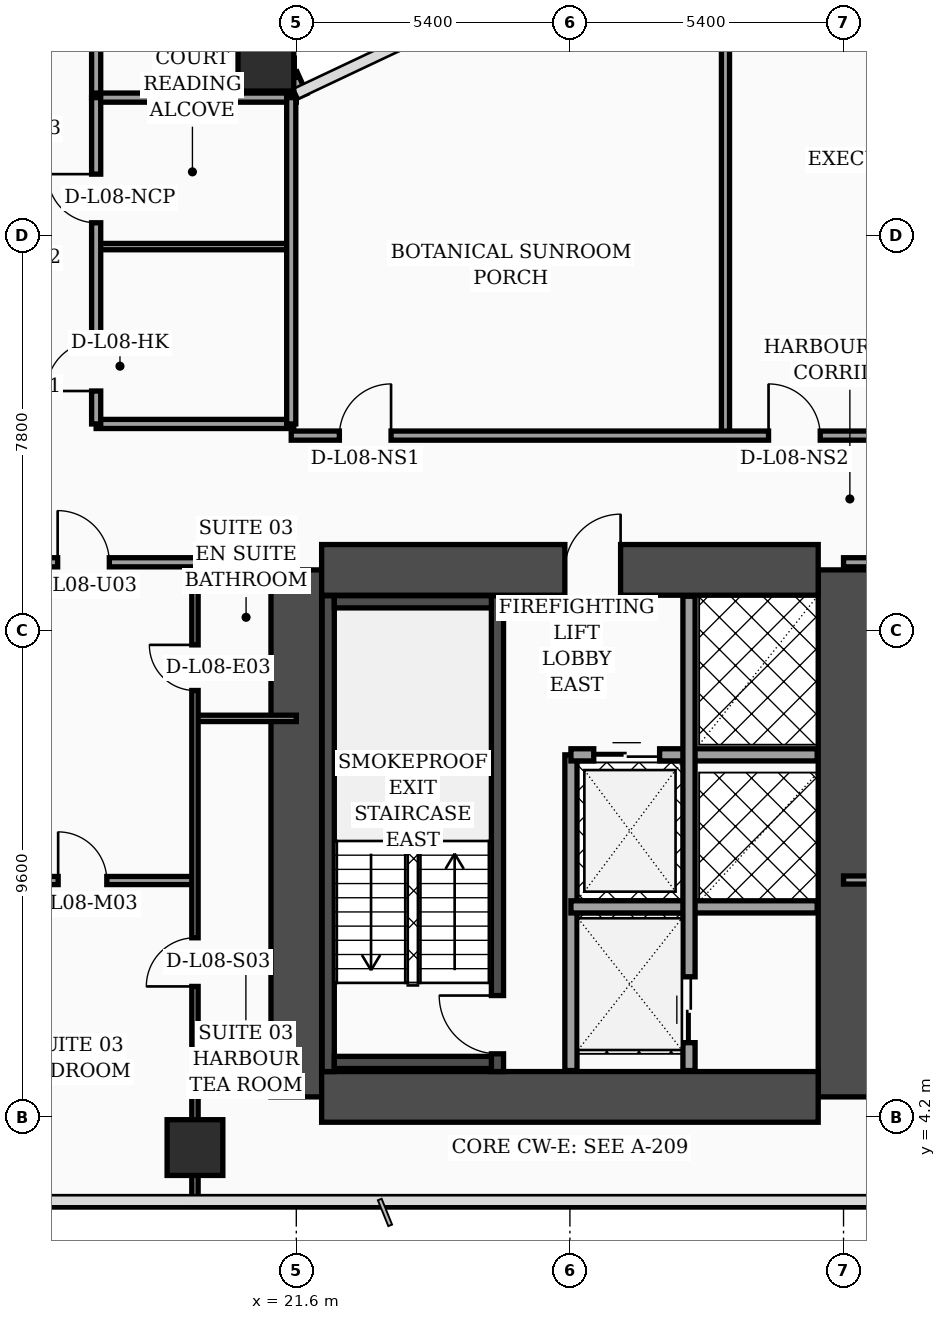
"""IFC4 building model, lengths in metres.
Left out: names, types, materials, properties, quantities, classifications, styles, units other than length and angle.
Written with IfcOpenShell. Run it as: python <this file> out.ifc"""

import sys

from ifc_helpers import new_model, si_unit, direction, frame, frame_2d, origin, origin_2d, place, context, subcontext, project, spatial, rectangle, hollow_rectangle, extrude, element, fill, save


model = new_model("IFC4")
c1 = context("Model", 3, precision=1e-05, world=origin(), true_north=direction((0.0, 1.0)))
c2 = subcontext(c1, "Body", "Model", "MODEL_VIEW")
j1 = project(units=[si_unit("LENGTHUNIT", "METRE"), si_unit("PLANEANGLEUNIT", "RADIAN")], contexts=[c1])
p1 = place(None, origin())
s1 = spatial("IfcSite", under=j1, at=p1, CompositionType="ELEMENT")
p2 = place(p1, origin())
s2 = spatial("IfcBuilding", under=s1, at=p2, CompositionType="ELEMENT")
p3 = place(p2, frame((0.0, 0.0, 38.4)))
s3 = spatial("IfcBuildingStorey", under=s2, at=p3, CompositionType="ELEMENT", Elevation=38.4)
for number, where, z_axis, x_axis in (
    (1, (21.6, 4.6, 0.0), (0.0, 0.0, 1.0), (0.0, 1.0, 0.0)),
    (2, (32.4, 4.6, 0.0), (0.0, 0.0, 1.0), (0.0, 1.0, 0.0)),
):
    element("IfcWall", number, at=place(p3, frame(where, z_axis=z_axis, x_axis=x_axis)), inside=s3, PredefinedType="SHEAR", context=c2, shape_type="SweptSolid", body=[
        extrude(rectangle(XDim=10.4, YDim=1.0, at=frame_2d((5.2, 0.0))), origin(), (0.0, 0.0, 1.0), 3.56),
    ])
p4 = place(p3, frame((22.1, 15.0, 0.0), z_axis=(0.0, 0.0, 1.0), x_axis=(1.0, 0.0, 0.0)))
e3 = element("IfcWall", 3, at=p4, inside=s3, PredefinedType="SHEAR", context=c2, shape_type="SweptSolid", body=[
    extrude(rectangle(XDim=9.8, YDim=1.0, at=frame_2d((4.9, 0.0))), origin(), (0.0, 0.0, 1.0), 3.56),
])
p5 = place(p4, frame((4.8, 0.0, 0.0)))
e4 = element("IfcOpeningElement", 4, at=p5, cuts=e3, PredefinedType="OPENING", context=c2, shape_type="SweptSolid", body=[
    extrude(rectangle(XDim=1.1, YDim=2.2, at=frame_2d((0.55, 1.1))), frame((0.0, 0.51, 0.0), z_axis=(0.0, -1.0, 0.0), x_axis=(1.0, 0.0, 0.0)), (0.0, 0.0, 1.0), 1.02),
])
p6 = place(p3, frame((22.1, 4.6, 0.0), z_axis=(0.0, 0.0, 1.0), x_axis=(1.0, 0.0, 0.0)))
e5 = element("IfcWall", 5, at=p6, inside=s3, PredefinedType="SHEAR", context=c2, shape_type="SweptSolid", body=[
    extrude(rectangle(XDim=9.8, YDim=1.0, at=frame_2d((4.9, 0.0))), origin(), (0.0, 0.0, 1.0), 3.56),
])
p7 = place(p3, frame((22.23, 5.1, 0.0), z_axis=(0.0, 0.0, 1.0), x_axis=(0.0, 1.0, 0.0)))
e6 = element("IfcWall", 6, at=p7, inside=s3, PredefinedType="SOLIDWALL", context=c2, shape_type="SweptSolid", body=[
    extrude(rectangle(XDim=9.39, YDim=0.24, at=frame_2d((4.695, 0.0))), origin(), (0.0, 0.0, 1.0), 3.56),
])
p8 = place(p3, frame((25.57, 5.1, 0.0), z_axis=(0.0, 0.0, 1.0), x_axis=(0.0, 1.0, 0.0)))
e7 = element("IfcWall", 7, at=p8, inside=s3, PredefinedType="SOLIDWALL", context=c2, shape_type="SweptSolid", body=[
    extrude(rectangle(XDim=9.39, YDim=0.24, at=frame_2d((4.695, 0.0))), origin(), (0.0, 0.0, 1.0), 3.56),
])
p9 = place(p8, frame((0.35, 0.0, 0.0)))
e8 = element("IfcOpeningElement", 8, at=p9, cuts=e7, PredefinedType="OPENING", context=c2, shape_type="SweptSolid", body=[
    extrude(rectangle(XDim=1.15, YDim=2.2, at=frame_2d((0.575, 1.1))), frame((0.0, 0.13, 0.0), z_axis=(0.0, -1.0, 0.0), x_axis=(1.0, 0.0, 0.0)), (0.0, 0.0, 1.0), 0.26),
])
for number, where, z_axis, x_axis in (
    (9, (22.35, 5.28, 0.0), (0.0, 0.0, 1.0), (1.0, 0.0, 0.0)),
    (10, (22.35, 14.37, 0.0), (0.0, 0.0, 1.0), (1.0, 0.0, 0.0)),
):
    element("IfcWall", number, at=place(p3, frame(where, z_axis=z_axis, x_axis=x_axis)), inside=s3, PredefinedType="SOLIDWALL", context=c2, shape_type="SweptSolid", body=[
        extrude(rectangle(XDim=3.1, YDim=0.24, at=frame_2d((1.55, 0.0))), origin(), (0.0, 0.0, 1.0), 3.56),
    ])
for number, where, z_axis, x_axis in (
    (11, (21.0, 25.0, 0.0), (0.0, 0.0, 1.0), (1.0, 0.0, 0.0)),
    (12, (19.6, 3.6, 0.0), (0.0, 0.0, 1.0), (1.0, 0.0, 0.0)),
):
    element("IfcColumn", number, at=place(p3, frame(where, z_axis=z_axis, x_axis=x_axis)), inside=s3, PredefinedType="COLUMN", context=c2, shape_type="SweptSolid", body=[
        extrude(hollow_rectangle(XDim=1.1, YDim=1.1, WallThickness=0.045, at=origin_2d()), origin(), (0.0, 0.0, 1.0), 3.56),
    ])
p10 = place(p3, frame((21.68, 24.34, 0.0), z_axis=(0.0, 0.0, 1.0), x_axis=(-0.40758134973, 0.913168901875, 0.0)))
e13 = element("IfcWall", 13, at=p10, inside=s3, PredefinedType="SOLIDWALL", context=c2, shape_type="SweptSolid", body=[
    extrude(rectangle(XDim=0.471, YDim=0.28, at=frame_2d((0.235, 0.0))), origin(), (0.0, 0.0, 1.0), 3.56),
])
p11 = place(p3, frame((27.02, 5.12, 0.0), z_axis=(0.0, 0.0, 1.0), x_axis=(0.0, 1.0, 0.0)))
e14 = element("IfcWall", 14, at=p11, inside=s3, PredefinedType="SOLIDWALL", context=c2, shape_type="SweptSolid", body=[
    extrude(rectangle(XDim=6.23, YDim=0.24, at=frame_2d((3.115, 0.0))), origin(), (0.0, 0.0, 1.0), 3.56),
])
p12 = place(p3, frame((27.02, 11.35, 0.0), z_axis=(0.0, 0.0, 1.0), x_axis=(1.0, 0.0, 0.0)))
e15 = element("IfcWall", 15, at=p12, inside=s3, PredefinedType="SOLIDWALL", context=c2, shape_type="SweptSolid", body=[
    extrude(rectangle(XDim=4.86, YDim=0.24, at=frame_2d((2.43, 0.0))), origin(), (0.0, 0.0, 1.0), 3.56),
])
p13 = place(p12, frame((0.45, 0.0, 0.0)))
e16 = element("IfcOpeningElement", 16, at=p13, cuts=e15, PredefinedType="OPENING", context=c2, shape_type="SweptSolid", body=[
    extrude(rectangle(XDim=1.3, YDim=2.35, at=frame_2d((0.65, 1.175))), frame((0.0, 0.13, 0.0), z_axis=(0.0, -1.0, 0.0), x_axis=(1.0, 0.0, 0.0)), (0.0, 0.0, 1.0), 0.26),
])
p14 = place(p3, frame((27.02, 8.35, 0.0), z_axis=(0.0, 0.0, 1.0), x_axis=(1.0, 0.0, 0.0)))
e17 = element("IfcWall", 17, at=p14, inside=s3, PredefinedType="SOLIDWALL", context=c2, shape_type="SweptSolid", body=[
    extrude(rectangle(XDim=4.86, YDim=0.24, at=frame_2d((2.43, 0.0))), origin(), (0.0, 0.0, 1.0), 3.56),
])
p15 = place(p3, frame((29.35, 5.12, 0.0), z_axis=(0.0, 0.0, 1.0), x_axis=(0.0, 1.0, 0.0)))
e18 = element("IfcWall", 18, at=p15, inside=s3, PredefinedType="SOLIDWALL", context=c2, shape_type="SweptSolid", body=[
    extrude(rectangle(XDim=9.36, YDim=0.24, at=frame_2d((4.68, 0.0))), origin(), (0.0, 0.0, 1.0), 3.56),
])
p16 = place(p15, frame((0.55, 0.0, 0.0)))
e19 = element("IfcOpeningElement", 19, at=p16, cuts=e18, PredefinedType="OPENING", context=c2, shape_type="SweptSolid", body=[
    extrude(rectangle(XDim=1.3, YDim=2.35, at=frame_2d((0.65, 1.175))), frame((0.0, 0.13, 0.0), z_axis=(0.0, -1.0, 0.0), x_axis=(1.0, 0.0, 0.0)), (0.0, 0.0, 1.0), 0.26),
])
p17 = place(p3, frame((19.6, 12.07, 0.0), z_axis=(0.0, 0.0, 1.0), x_axis=(1.0, 0.0, 0.0)))
e20 = element("IfcWall", 20, at=p17, inside=s3, PredefinedType="PARTITIONING", context=c2, shape_type="SweptSolid", body=[
    extrude(rectangle(XDim=2.0, YDim=0.125, at=frame_2d((1.0, 0.0))), origin(), (0.0, 0.0, 1.0), 3.56),
])
p18 = place(p3, frame((15.15, 8.87, 0.0), z_axis=(0.0, 0.0, 1.0), x_axis=(1.0, 0.0, 0.0)))
e21 = element("IfcWall", 21, at=p18, inside=s3, PredefinedType="PARTITIONING", context=c2, shape_type="SweptSolid", body=[
    extrude(rectangle(XDim=4.45, YDim=0.16, at=frame_2d((2.225, 0.0))), origin(), (0.0, 0.0, 1.0), 3.56),
])
p19 = place(p18, frame((1.75, 0.0, 0.0)))
e22 = element("IfcOpeningElement", 22, at=p19, cuts=e21, PredefinedType="OPENING", context=c2, shape_type="SweptSolid", body=[
    extrude(rectangle(XDim=0.96, YDim=2.2, at=frame_2d((0.48, 1.1))), frame((0.0, 0.09, 0.0), z_axis=(0.0, -1.0, 0.0), x_axis=(1.0, 0.0, 0.0)), (0.0, 0.0, 1.0), 0.18),
])
p20 = place(p3, frame((19.6, 2.44, 0.0), z_axis=(0.0, 0.0, 1.0), x_axis=(0.0, 1.0, 0.0)))
e23 = element("IfcWall", 23, at=p20, inside=s3, PredefinedType="PARTITIONING", context=c2, shape_type="SweptSolid", body=[
    extrude(rectangle(XDim=12.71, YDim=0.125, at=frame_2d((6.355, 0.0))), origin(), (0.0, 0.0, 1.0), 2.34),
])
p21 = place(p20, frame((4.34, 0.0, 0.0)))
e24 = element("IfcOpeningElement", 24, at=p21, cuts=e23, PredefinedType="OPENING", context=c2, shape_type="SweptSolid", body=[
    extrude(rectangle(XDim=0.96, YDim=2.2, at=frame_2d((0.48, 1.1))), frame((0.0, 0.073, 0.0), z_axis=(0.0, -1.0, 0.0), x_axis=(1.0, 0.0, 0.0)), (0.0, 0.0, 1.0), 0.145),
])
p22 = place(p20, frame((10.18, 0.0, 0.0)))
e25 = element("IfcOpeningElement", 25, at=p22, cuts=e23, PredefinedType="OPENING", context=c2, shape_type="SweptSolid", body=[
    extrude(rectangle(XDim=0.9, YDim=2.15, at=frame_2d((0.45, 1.075))), frame((0.0, 0.073, 0.0), z_axis=(0.0, -1.0, 0.0), x_axis=(1.0, 0.0, 0.0)), (0.0, 0.0, 1.0), 0.145),
])
p23 = place(p3, frame((15.15, 15.15, 0.0), z_axis=(0.0, 0.0, 1.0), x_axis=(1.0, 0.0, 0.0)))
e26 = element("IfcWall", 26, at=p23, inside=s3, PredefinedType="PARTITIONING", context=c2, shape_type="SweptSolid", body=[
    extrude(rectangle(XDim=6.45, YDim=0.18, at=frame_2d((3.225, 0.0))), origin(), (0.0, 0.0, 1.0), 2.34),
])
p24 = place(p23, frame((1.74, 0.0, 0.0)))
e27 = element("IfcOpeningElement", 27, at=p24, cuts=e26, PredefinedType="OPENING", context=c2, shape_type="SweptSolid", body=[
    extrude(rectangle(XDim=1.02, YDim=2.2, at=frame_2d((0.51, 1.1))), frame((0.0, 0.1, 0.0), z_axis=(0.0, -1.0, 0.0), x_axis=(1.0, 0.0, 0.0)), (0.0, 0.0, 1.0), 0.2),
])
p25 = place(p3, frame((17.65, 24.3, 0.0), z_axis=(0.0, 0.0, 1.0), x_axis=(0.0, 1.0, 0.0)))
e28 = element("IfcWall", 28, at=p25, inside=s3, PredefinedType="PARTITIONING", context=c2, shape_type="SweptSolid", body=[
    extrude(rectangle(XDim=16.4, YDim=0.18, at=frame_2d((8.2, 0.0))), origin(), (0.0, 0.0, 1.0), 2.84),
])
p26 = place(p3, frame((17.65, 17.88, 0.0), z_axis=(0.0, 0.0, 1.0), x_axis=(1.0, 0.0, 0.0)))
e29 = element("IfcWall", 29, at=p26, inside=s3, PredefinedType="PARTITIONING", context=c2, shape_type="SweptSolid", body=[
    extrude(rectangle(XDim=3.9, YDim=0.18, at=frame_2d((1.95, 0.0))), origin(), (0.0, 0.0, 1.0), 3.56),
])
p27 = place(p3, frame((17.65, 21.38, 0.0), z_axis=(0.0, 0.0, 1.0), x_axis=(1.0, 0.0, 0.0)))
e30 = element("IfcWall", 30, at=p27, inside=s3, PredefinedType="PARTITIONING", context=c2, shape_type="SweptSolid", body=[
    extrude(rectangle(XDim=3.9, YDim=0.125, at=frame_2d((1.95, 0.0))), origin(), (0.0, 0.0, 1.0), 3.09),
])
p28 = place(p3, frame((17.65, 24.32, 0.0), z_axis=(0.0, 0.0, 1.0), x_axis=(1.0, 0.0, 0.0)))
e31 = element("IfcWall", 31, at=p28, inside=s3, PredefinedType="PARTITIONING", context=c2, shape_type="SweptSolid", body=[
    extrude(rectangle(XDim=3.95, YDim=0.18, at=frame_2d((1.975, 0.0))), origin(), (0.0, 0.0, 1.0), 3.56),
])
p29 = place(p3, frame((21.5, 17.88, 0.0), z_axis=(0.0, 0.0, 1.0), x_axis=(0.0, 1.0, 0.0)))
e32 = element("IfcWall", 32, at=p29, inside=s3, PredefinedType="PARTITIONING", context=c2, shape_type="SweptSolid", body=[
    extrude(rectangle(XDim=6.44, YDim=0.18, at=frame_2d((3.22, 0.0))), origin(), (0.0, 0.0, 1.0), 3.09),
])
p30 = place(p3, frame((17.65, 17.88, 0.0), z_axis=(0.0, 0.0, 1.0), x_axis=(0.0, 1.0, 0.0)))
e33 = element("IfcWall", 33, at=p30, inside=s3, PredefinedType="PARTITIONING", context=c2, shape_type="SweptSolid", body=[
    extrude(rectangle(XDim=6.44, YDim=0.18, at=frame_2d((3.22, 0.0))), origin(), (0.0, 0.0, 1.0), 3.09),
])
p31 = place(p30, frame((0.65, 0.0, 0.0)))
e34 = element("IfcOpeningElement", 34, at=p31, cuts=e33, PredefinedType="OPENING", context=c2, shape_type="SweptSolid", body=[
    extrude(rectangle(XDim=0.98, YDim=2.15, at=frame_2d((0.49, 1.075))), frame((0.0, 0.1, 0.0), z_axis=(0.0, -1.0, 0.0), x_axis=(1.0, 0.0, 0.0)), (0.0, 0.0, 1.0), 0.2),
])
p32 = place(p30, frame((3.97, 0.0, 0.0)))
e35 = element("IfcOpeningElement", 35, at=p32, cuts=e33, PredefinedType="OPENING", context=c2, shape_type="SweptSolid", body=[
    extrude(rectangle(XDim=0.96, YDim=2.2, at=frame_2d((0.48, 1.1))), frame((0.0, 0.1, 0.0), z_axis=(0.0, -1.0, 0.0), x_axis=(1.0, 0.0, 0.0)), (0.0, 0.0, 1.0), 0.2),
])
p33 = place(p3, frame((32.4, 8.88, 0.0), z_axis=(0.0, 0.0, 1.0), x_axis=(1.0, 0.0, 0.0)))
e36 = element("IfcWall", 36, at=p33, inside=s3, PredefinedType="PARTITIONING", context=c2, shape_type="SweptSolid", body=[
    extrude(rectangle(XDim=6.72, YDim=0.16, at=frame_2d((3.36, 0.0))), origin(), (0.0, 0.0, 1.0), 2.84),
])
p34 = place(p33, frame((2.88, 0.0, 0.0)))
e37 = element("IfcOpeningElement", 37, at=p34, cuts=e36, PredefinedType="OPENING", context=c2, shape_type="SweptSolid", body=[
    extrude(rectangle(XDim=0.96, YDim=2.2, at=frame_2d((0.48, 1.1))), frame((0.0, 0.09, 0.0), z_axis=(0.0, -1.0, 0.0), x_axis=(1.0, 0.0, 0.0)), (0.0, 0.0, 1.0), 0.18),
])
p35 = place(p3, frame((32.4, 15.15, 0.0), z_axis=(0.0, 0.0, 1.0), x_axis=(1.0, 0.0, 0.0)))
e38 = element("IfcWall", 38, at=p35, inside=s3, PredefinedType="PARTITIONING", context=c2, shape_type="SweptSolid", body=[
    extrude(rectangle(XDim=15.0, YDim=0.18, at=frame_2d((7.5, 0.0))), origin(), (0.0, 0.0, 1.0), 2.84),
])
p36 = place(p35, frame((2.95, 0.0, 0.0)))
e39 = element("IfcOpeningElement", 39, at=p36, cuts=e38, PredefinedType="OPENING", context=c2, shape_type="SweptSolid", body=[
    extrude(rectangle(XDim=1.02, YDim=2.2, at=frame_2d((0.51, 1.1))), frame((0.0, 0.1, 0.0), z_axis=(0.0, -1.0, 0.0), x_axis=(1.0, 0.0, 0.0)), (0.0, 0.0, 1.0), 0.2),
])
p37 = place(p35, frame((10.45, 0.0, 0.0)))
e40 = element("IfcOpeningElement", 40, at=p37, cuts=e38, PredefinedType="OPENING", context=c2, shape_type="SweptSolid", body=[
    extrude(rectangle(XDim=1.02, YDim=2.2, at=frame_2d((0.51, 1.1))), frame((0.0, 0.1, 0.0), z_axis=(0.0, -1.0, 0.0), x_axis=(1.0, 0.0, 0.0)), (0.0, 0.0, 1.0), 0.2),
])
p38 = place(p3, frame((30.07, 17.65, 0.0), z_axis=(0.0, 0.0, 1.0), x_axis=(0.0, 1.0, 0.0)))
e41 = element("IfcWall", 41, at=p38, inside=s3, PredefinedType="PARTITIONING", context=c2, shape_type="SweptSolid", body=[
    extrude(rectangle(XDim=10.83, YDim=0.16, at=frame_2d((5.415, 0.0))), origin(), (0.0, 0.0, 1.0), 2.84),
])
p39 = place(p3, frame((21.5, 17.65, 0.0), z_axis=(0.0, 0.0, 1.0), x_axis=(1.0, 0.0, 0.0)))
e42 = element("IfcWall", 42, at=p39, inside=s3, PredefinedType="PARTITIONING", context=c2, shape_type="SweptSolid", body=[
    extrude(rectangle(XDim=23.55, YDim=0.18, at=frame_2d((11.775, 0.0))), origin(), (0.0, 0.0, 1.0), 2.84),
])
p40 = place(p39, frame((0.95, 0.0, 0.0)))
e43 = element("IfcOpeningElement", 43, at=p40, cuts=e42, PredefinedType="OPENING", context=c2, shape_type="SweptSolid", body=[
    extrude(rectangle(XDim=1.02, YDim=2.2, at=frame_2d((0.51, 1.1))), frame((0.0, 0.1, 0.0), z_axis=(0.0, -1.0, 0.0), x_axis=(1.0, 0.0, 0.0)), (0.0, 0.0, 1.0), 0.2),
])
p41 = place(p39, frame((9.42, 0.0, 0.0)))
e44 = element("IfcOpeningElement", 44, at=p41, cuts=e42, PredefinedType="OPENING", context=c2, shape_type="SweptSolid", body=[
    extrude(rectangle(XDim=1.02, YDim=2.2, at=frame_2d((0.51, 1.1))), frame((0.0, 0.1, 0.0), z_axis=(0.0, -1.0, 0.0), x_axis=(1.0, 0.0, 0.0)), (0.0, 0.0, 1.0), 0.2),
])
p42 = place(p39, frame((16.58, 0.0, 0.0)))
e45 = element("IfcOpeningElement", 45, at=p42, cuts=e42, PredefinedType="OPENING", context=c2, shape_type="SweptSolid", body=[
    extrude(rectangle(XDim=1.02, YDim=2.2, at=frame_2d((0.51, 1.1))), frame((0.0, 0.1, 0.0), z_axis=(0.0, -1.0, 0.0), x_axis=(1.0, 0.0, 0.0)), (0.0, 0.0, 1.0), 0.2),
])
p43 = place(p13, origin())
e46 = element("IfcDoor", 46, at=p43, inside=s3, OperationType="DOUBLE_DOOR_SLIDING", PredefinedType="DOOR", context=c2, shape_type="SweptSolid", body=[
    extrude(rectangle(XDim=1.3, YDim=2.35, at=frame_2d((0.65, 1.175))), frame((0.0, 0.025, 0.0), z_axis=(0.0, -1.0, 0.0), x_axis=(1.0, 0.0, 0.0)), (0.0, 0.0, 1.0), 0.05),
])
fill(e16, e46)
p44 = place(p16, origin())
e47 = element("IfcDoor", 47, at=p44, inside=s3, OperationType="DOUBLE_DOOR_SLIDING", PredefinedType="DOOR", context=c2, shape_type="SweptSolid", body=[
    extrude(rectangle(XDim=1.3, YDim=2.35, at=frame_2d((0.65, 1.175))), frame((0.0, 0.025, 0.0), z_axis=(0.0, -1.0, 0.0), x_axis=(1.0, 0.0, 0.0)), (0.0, 0.0, 1.0), 0.05),
])
fill(e19, e47)
p45 = place(p19, origin())
e48 = element("IfcDoor", 48, at=p45, inside=s3, OperationType="SINGLE_SWING_LEFT", PredefinedType="DOOR", context=c2, shape_type="SweptSolid", body=[
    extrude(rectangle(XDim=0.96, YDim=2.2, at=frame_2d((0.48, 1.1))), frame((0.0, 0.025, 0.0), z_axis=(0.0, -1.0, 0.0), x_axis=(1.0, 0.0, 0.0)), (0.0, 0.0, 1.0), 0.05),
])
fill(e22, e48)
p46 = place(p21, origin())
e49 = element("IfcDoor", 49, at=p46, inside=s3, OperationType="SINGLE_SWING_LEFT", PredefinedType="DOOR", context=c2, shape_type="SweptSolid", body=[
    extrude(rectangle(XDim=0.96, YDim=2.2, at=frame_2d((0.48, 1.1))), frame((0.0, 0.025, 0.0), z_axis=(0.0, -1.0, 0.0), x_axis=(1.0, 0.0, 0.0)), (0.0, 0.0, 1.0), 0.05),
])
fill(e24, e49)
p47 = place(p22, origin())
e50 = element("IfcDoor", 50, at=p47, inside=s3, OperationType="SINGLE_SWING_RIGHT", PredefinedType="DOOR", context=c2, shape_type="SweptSolid", body=[
    extrude(rectangle(XDim=0.9, YDim=2.15, at=frame_2d((0.45, 1.075))), frame((0.0, 0.025, 0.0), z_axis=(0.0, -1.0, 0.0), x_axis=(1.0, 0.0, 0.0)), (0.0, 0.0, 1.0), 0.05),
])
fill(e25, e50)
p48 = place(p24, origin())
e51 = element("IfcDoor", 51, at=p48, inside=s3, OperationType="SINGLE_SWING_LEFT", PredefinedType="DOOR", context=c2, shape_type="SweptSolid", body=[
    extrude(rectangle(XDim=1.02, YDim=2.2, at=frame_2d((0.51, 1.1))), frame((0.0, 0.025, 0.0), z_axis=(0.0, -1.0, 0.0), x_axis=(1.0, 0.0, 0.0)), (0.0, 0.0, 1.0), 0.05),
])
fill(e27, e51)
p49 = place(p31, origin())
e52 = element("IfcDoor", 52, at=p49, inside=s3, OperationType="SINGLE_SWING_LEFT", PredefinedType="DOOR", context=c2, shape_type="SweptSolid", body=[
    extrude(rectangle(XDim=0.98, YDim=2.15, at=frame_2d((0.49, 1.075))), frame((0.0, 0.025, 0.0), z_axis=(0.0, -1.0, 0.0), x_axis=(1.0, 0.0, 0.0)), (0.0, 0.0, 1.0), 0.05),
])
fill(e34, e52)
p50 = place(p32, origin())
e53 = element("IfcDoor", 53, at=p50, inside=s3, OperationType="SINGLE_SWING_RIGHT", PredefinedType="DOOR", context=c2, shape_type="SweptSolid", body=[
    extrude(rectangle(XDim=0.96, YDim=2.2, at=frame_2d((0.48, 1.1))), frame((0.0, 0.025, 0.0), z_axis=(0.0, -1.0, 0.0), x_axis=(1.0, 0.0, 0.0)), (0.0, 0.0, 1.0), 0.05),
])
fill(e35, e53)
p51 = place(p40, origin())
e54 = element("IfcDoor", 54, at=p51, inside=s3, OperationType="SINGLE_SWING_RIGHT", PredefinedType="DOOR", context=c2, shape_type="SweptSolid", body=[
    extrude(rectangle(XDim=1.02, YDim=2.2, at=frame_2d((0.51, 1.1))), frame((0.0, 0.025, 0.0), z_axis=(0.0, -1.0, 0.0), x_axis=(1.0, 0.0, 0.0)), (0.0, 0.0, 1.0), 0.05),
])
fill(e43, e54)
p52 = place(p41, origin())
e55 = element("IfcDoor", 55, at=p52, inside=s3, OperationType="SINGLE_SWING_LEFT", PredefinedType="DOOR", context=c2, shape_type="SweptSolid", body=[
    extrude(rectangle(XDim=1.02, YDim=2.2, at=frame_2d((0.51, 1.1))), frame((0.0, 0.025, 0.0), z_axis=(0.0, -1.0, 0.0), x_axis=(1.0, 0.0, 0.0)), (0.0, 0.0, 1.0), 0.05),
])
fill(e44, e55)
p53 = place(p9, origin())
e56 = element("IfcDoor", 56, at=p53, inside=s3, OperationType="SINGLE_SWING_RIGHT", PredefinedType="DOOR", context=c2, shape_type="SweptSolid", body=[
    extrude(rectangle(XDim=1.15, YDim=2.2, at=frame_2d((0.575, 1.1))), frame((0.0, 0.025, 0.0), z_axis=(0.0, -1.0, 0.0), x_axis=(1.0, 0.0, 0.0)), (0.0, 0.0, 1.0), 0.05),
])
fill(e8, e56)
p54 = place(p5, origin())
e57 = element("IfcDoor", 57, at=p54, inside=s3, OperationType="SINGLE_SWING_RIGHT", PredefinedType="DOOR", context=c2, shape_type="SweptSolid", body=[
    extrude(rectangle(XDim=1.1, YDim=2.2, at=frame_2d((0.55, 1.1))), frame((0.0, 0.025, 0.0), z_axis=(0.0, -1.0, 0.0), x_axis=(1.0, 0.0, 0.0)), (0.0, 0.0, 1.0), 0.05),
])
fill(e4, e57)
save(model, sys.argv[1])
